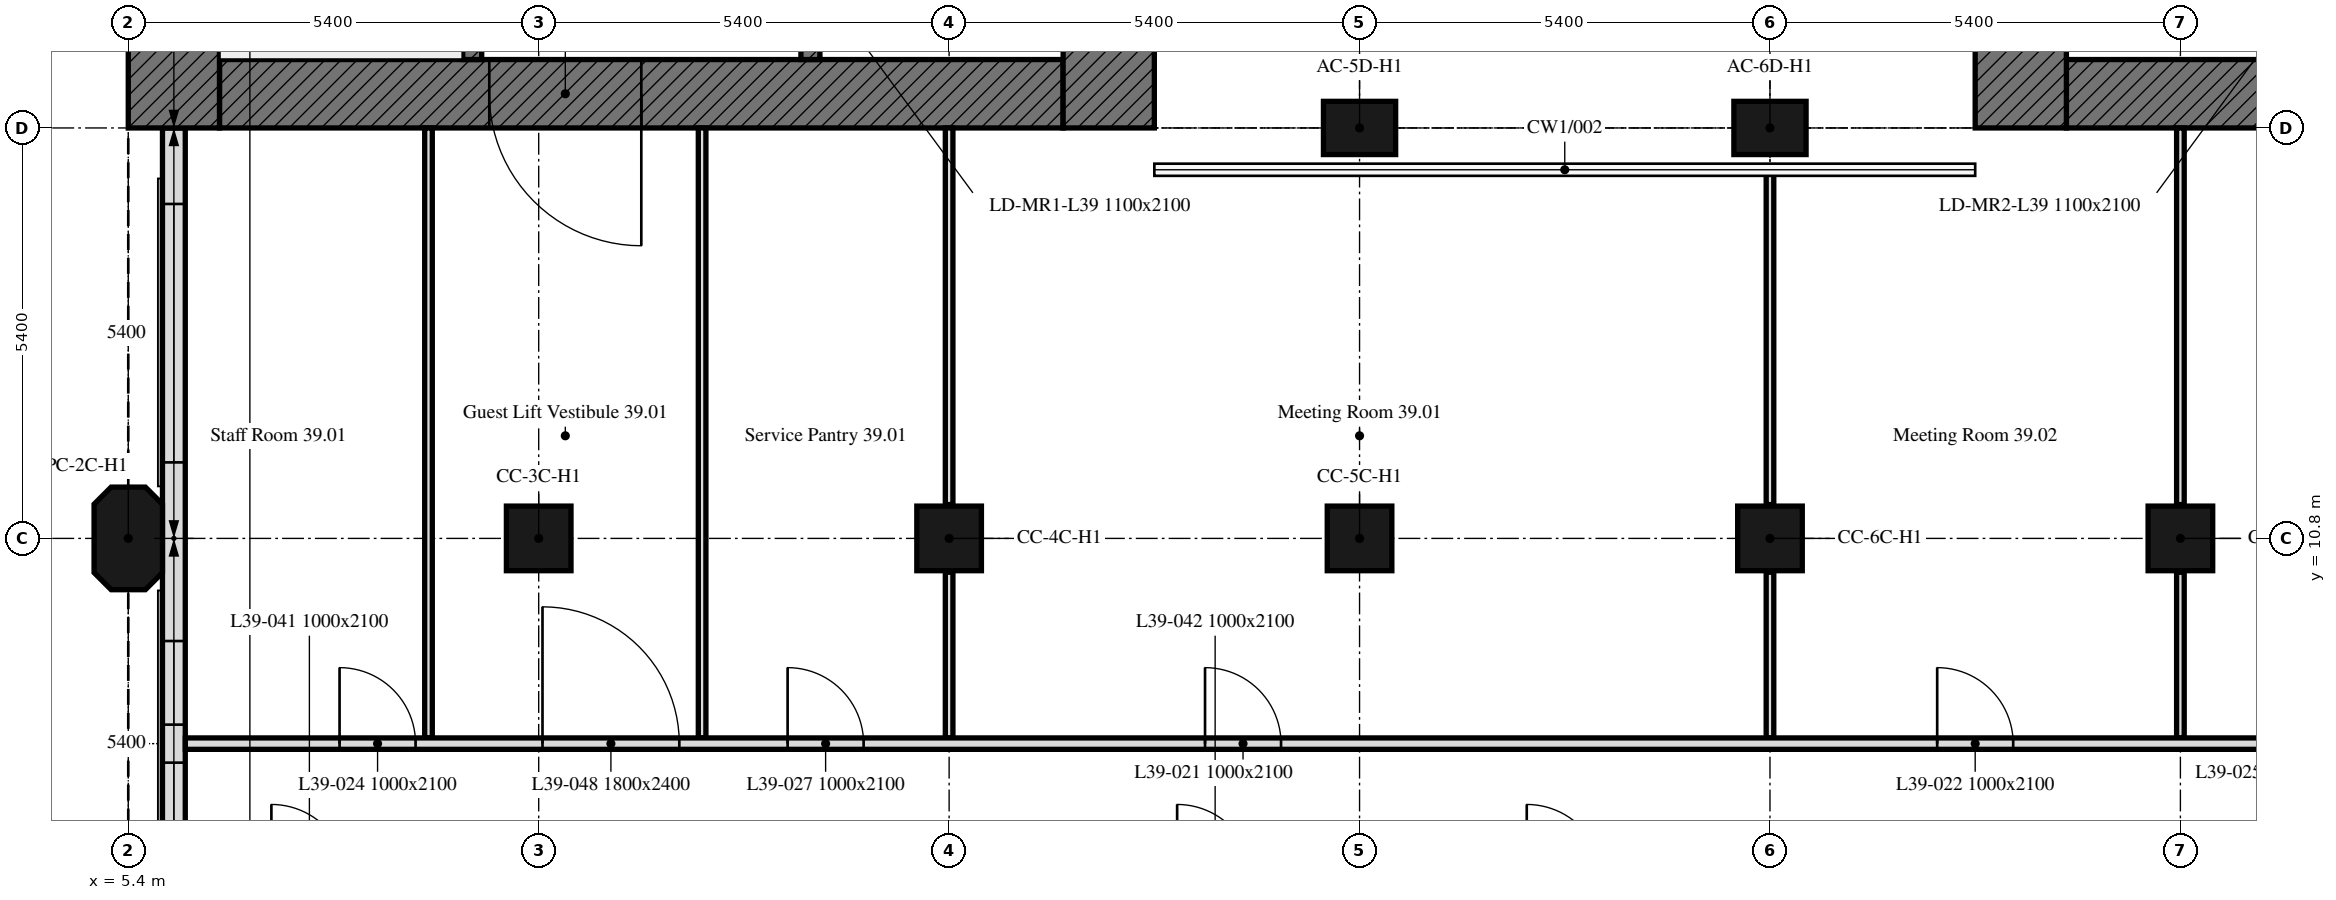
"""IFC4 building model, lengths in metres.
Left out: names, types, materials, properties, quantities, classifications, styles, units other than length and angle.
Written with IfcOpenShell. Run it as: python <this file> out.ifc"""

import sys

from ifc_helpers import new_model, si_unit, direction, frame, frame_2d, origin, origin_2d, place, context, subcontext, project, spatial, polyline, rectangle, outline, extrude, element, fill, save


model = new_model("IFC4")
c1 = context("Model", 3, precision=1e-05, world=origin(), true_north=direction((0.0, 1.0)))
c2 = subcontext(c1, "Body", "Model", "MODEL_VIEW")
j1 = project(units=[si_unit("LENGTHUNIT", "METRE"), si_unit("PLANEANGLEUNIT", "RADIAN")], contexts=[c1])
p1 = place(None, origin())
s1 = spatial("IfcSite", under=j1, at=p1, CompositionType="ELEMENT")
p2 = place(p1, origin())
s2 = spatial("IfcBuilding", under=s1, at=p2, CompositionType="ELEMENT")
p3 = place(p2, frame((0.0, 0.0, 166.0)))
s3 = spatial("IfcBuildingStorey", under=s2, at=p3, CompositionType="ELEMENT", Elevation=166.0)
p4 = place(p3, frame((5.4, 10.8, 0.0), z_axis=(0.0, 0.0, 1.0), x_axis=(0.0, 1.0, 0.0)))
e1 = element("IfcColumn", 1, at=p4, inside=s3, PredefinedType="COLUMN", context=c2, shape_type="SweptSolid", body=[
    extrude(outline(polyline([(-0.45, -0.45), (0.45, -0.45), (0.675, -0.225), (0.675, 0.225), (0.45, 0.45), (-0.45, 0.45), (-0.675, 0.225), (-0.675, -0.225), (-0.45, -0.45)])), origin(), (0.0, 0.0, 1.0), 3.0),
])
for number, where, z_axis, x_axis in (
    (2, (10.8, 10.8, 0.0), (0.0, 0.0, 1.0), (1.0, 0.0, 0.0)),
    (3, (16.2, 10.8, 0.0), (0.0, 0.0, 1.0), (1.0, 0.0, 0.0)),
    (4, (21.6, 10.8, 0.0), (0.0, 0.0, 1.0), (1.0, 0.0, 0.0)),
    (5, (27.0, 10.8, 0.0), (0.0, 0.0, 1.0), (1.0, 0.0, 0.0)),
    (6, (32.4, 10.8, 0.0), (0.0, 0.0, 1.0), (1.0, 0.0, 0.0)),
):
    element("IfcColumn", number, at=place(p3, frame(where, z_axis=z_axis, x_axis=x_axis)), inside=s3, PredefinedType="COLUMN", context=c2, shape_type="SweptSolid", body=[
        extrude(rectangle(XDim=0.85, YDim=0.85, at=origin_2d()), origin(), (0.0, 0.0, 1.0), 3.0),
    ])
for number, where, z_axis, x_axis in (
    (7, (21.6, 16.2, 0.0), (0.0, 0.0, 1.0), (1.0, 0.0, 0.0)),
    (8, (27.0, 16.2, 0.0), (0.0, 0.0, 1.0), (1.0, 0.0, 0.0)),
):
    element("IfcColumn", number, at=place(p3, frame(where, z_axis=z_axis, x_axis=x_axis)), inside=s3, PredefinedType="COLUMN", context=c2, shape_type="SweptSolid", body=[
        extrude(rectangle(XDim=0.95, YDim=0.7, at=origin_2d()), origin(), (0.0, 0.0, 1.0), 3.0),
    ])
p5 = place(p3, frame((6.0, 16.2, 0.0), z_axis=(0.0, 0.0, 1.0), x_axis=(0.0, -1.0, 0.0)))
e9 = element("IfcWall", 9, at=p5, inside=s3, PredefinedType="SOLIDWALL", context=c2, shape_type="SweptSolid", body=[
    extrude(rectangle(XDim=10.614, YDim=0.3, at=frame_2d((5.307, 0.0))), origin(), (0.0, 0.0, 1.0), 3.0),
])
p6 = place(p5, frame((1.0, 0.0, 0.9)))
e10 = element("IfcOpeningElement", 10, at=p6, cuts=e9, PredefinedType="OPENING", context=c2, shape_type="SweptSolid", body=[
    extrude(rectangle(XDim=3.4, YDim=1.7, at=frame_2d((1.7, 0.85))), frame((0.0, 0.16, 0.0), z_axis=(0.0, -1.0, 0.0), x_axis=(1.0, 0.0, 0.0)), (0.0, 0.0, 1.0), 0.32),
])
p7 = place(p5, frame((6.75, 0.0, 0.9)))
e11 = element("IfcOpeningElement", 11, at=p7, cuts=e9, PredefinedType="OPENING", context=c2, shape_type="SweptSolid", body=[
    extrude(rectangle(XDim=1.1, YDim=1.7, at=frame_2d((0.55, 0.85))), frame((0.0, 0.16, 0.0), z_axis=(0.0, -1.0, 0.0), x_axis=(1.0, 0.0, 0.0)), (0.0, 0.0, 1.0), 0.32),
])
p8 = place(p5, frame((8.35, 0.0, 0.9)))
e12 = element("IfcOpeningElement", 12, at=p8, cuts=e9, PredefinedType="OPENING", context=c2, shape_type="SweptSolid", body=[
    extrude(rectangle(XDim=1.1, YDim=1.7, at=frame_2d((0.55, 0.85))), frame((0.0, 0.16, 0.0), z_axis=(0.0, -1.0, 0.0), x_axis=(1.0, 0.0, 0.0)), (0.0, 0.0, 1.0), 0.32),
])
p9 = place(p3, frame((17.7, 16.65, 0.0), z_axis=(0.0, 0.0, 1.0), x_axis=(-1.0, 0.0, 0.0)))
e13 = element("IfcWall", 13, at=p9, inside=s3, PredefinedType="SOLIDWALL", context=c2, shape_type="SweptSolid", body=[
    extrude(rectangle(XDim=11.1, YDim=0.9, at=frame_2d((5.55, 0.0))), origin(), (0.0, 0.0, 1.0), 3.0),
])
p10 = place(p9, frame((5.55, 0.0, 0.0)))
e14 = element("IfcOpeningElement", 14, at=p10, cuts=e13, PredefinedType="OPENING", context=c2, shape_type="SweptSolid", body=[
    extrude(rectangle(XDim=2.0, YDim=2.4, at=frame_2d((1.0, 1.2))), frame((0.0, 0.45, 0.0), z_axis=(0.0, -1.0, 0.0), x_axis=(1.0, 0.0, 0.0)), (0.0, 0.0, 1.0), 0.9),
])
for number, where, z_axis, x_axis in (
    (15, (6.0, 16.2, 0.0), (0.0, 0.0, 1.0), (0.0, 1.0, 0.0)),
    (16, (18.3, 32.4, 0.0), (0.0, 0.0, 1.0), (0.0, -1.0, 0.0)),
):
    element("IfcWall", number, at=place(p3, frame(where, z_axis=z_axis, x_axis=x_axis)), inside=s3, PredefinedType="SOLIDWALL", context=c2, shape_type="SweptSolid", body=[
        extrude(rectangle(XDim=16.2, YDim=1.2, at=frame_2d((8.1, 0.0))), origin(), (0.0, 0.0, 1.0), 3.0),
    ])
p11 = place(p3, frame((9.925, 17.1, 0.0), z_axis=(0.0, 0.0, 1.0), x_axis=(0.0, 1.0, 0.0)))
e17 = element("IfcWall", 17, at=p11, inside=s3, PredefinedType="SOLIDWALL", context=c2, shape_type="SweptSolid", body=[
    extrude(rectangle(XDim=14.4, YDim=0.25, at=frame_2d((7.2, 0.0))), origin(), (0.0, 0.0, 1.0), 3.0),
])
p12 = place(p11, frame((4.6, 0.0, 0.0)))
e18 = element("IfcOpeningElement", 18, at=p12, cuts=e17, PredefinedType="OPENING", context=c2, shape_type="SweptSolid", body=[
    extrude(rectangle(XDim=1.0, YDim=2.1, at=frame_2d((0.5, 1.05))), frame((0.0, 0.125, 0.0), z_axis=(0.0, -1.0, 0.0), x_axis=(1.0, 0.0, 0.0)), (0.0, 0.0, 1.0), 0.25),
])
p13 = place(p11, frame((7.062, 0.0, 0.0)))
e19 = element("IfcOpeningElement", 19, at=p13, cuts=e17, PredefinedType="OPENING", context=c2, shape_type="SweptSolid", body=[
    extrude(rectangle(XDim=1.2, YDim=2.1, at=frame_2d((0.6, 1.05))), frame((0.0, 0.125, 0.0), z_axis=(0.0, -1.0, 0.0), x_axis=(1.0, 0.0, 0.0)), (0.0, 0.0, 1.0), 0.25),
])
p14 = place(p11, frame((10.106, 0.0, 0.0)))
e20 = element("IfcOpeningElement", 20, at=p14, cuts=e17, PredefinedType="OPENING", context=c2, shape_type="SweptSolid", body=[
    extrude(rectangle(XDim=0.9, YDim=2.1, at=frame_2d((0.45, 1.05))), frame((0.0, 0.125, 0.0), z_axis=(0.0, -1.0, 0.0), x_axis=(1.0, 0.0, 0.0)), (0.0, 0.0, 1.0), 0.25),
])
p15 = place(p11, frame((12.048, 0.0, 0.0)))
e21 = element("IfcOpeningElement", 21, at=p15, cuts=e17, PredefinedType="OPENING", context=c2, shape_type="SweptSolid", body=[
    extrude(rectangle(XDim=0.9, YDim=2.1, at=frame_2d((0.45, 1.05))), frame((0.0, 0.125, 0.0), z_axis=(0.0, -1.0, 0.0), x_axis=(1.0, 0.0, 0.0)), (0.0, 0.0, 1.0), 0.25),
])
p16 = place(p11, frame((13.354, 0.0, 0.0)))
e22 = element("IfcOpeningElement", 22, at=p16, cuts=e17, PredefinedType="OPENING", context=c2, shape_type="SweptSolid", body=[
    extrude(rectangle(XDim=0.9, YDim=2.1, at=frame_2d((0.45, 1.05))), frame((0.0, 0.125, 0.0), z_axis=(0.0, -1.0, 0.0), x_axis=(1.0, 0.0, 0.0)), (0.0, 0.0, 1.0), 0.25),
])
p17 = place(p3, frame((14.375, 17.1, 0.0), z_axis=(0.0, 0.0, 1.0), x_axis=(0.0, 1.0, 0.0)))
e23 = element("IfcWall", 23, at=p17, inside=s3, PredefinedType="SOLIDWALL", context=c2, shape_type="SweptSolid", body=[
    extrude(rectangle(XDim=14.4, YDim=0.25, at=frame_2d((7.2, 0.0))), origin(), (0.0, 0.0, 1.0), 3.0),
])
p18 = place(p17, frame((13.15, 0.0, 0.0)))
e24 = element("IfcOpeningElement", 24, at=p18, cuts=e23, PredefinedType="OPENING", context=c2, shape_type="SweptSolid", body=[
    extrude(rectangle(XDim=1.0, YDim=2.1, at=frame_2d((0.5, 1.05))), frame((0.0, 0.125, 0.0), z_axis=(0.0, -1.0, 0.0), x_axis=(1.0, 0.0, 0.0)), (0.0, 0.0, 1.0), 0.25),
])
p19 = place(p17, frame((0.6, 0.0, 0.0)))
e25 = element("IfcOpeningElement", 25, at=p19, cuts=e23, PredefinedType="OPENING", context=c2, shape_type="SweptSolid", body=[
    extrude(rectangle(XDim=1.1, YDim=2.1, at=frame_2d((0.55, 1.05))), frame((0.0, 0.125, 0.0), z_axis=(0.0, -1.0, 0.0), x_axis=(1.0, 0.0, 0.0)), (0.0, 0.0, 1.0), 0.25),
])
p20 = place(p17, frame((3.25, 0.0, 0.0)))
e26 = element("IfcOpeningElement", 26, at=p20, cuts=e23, PredefinedType="OPENING", context=c2, shape_type="SweptSolid", body=[
    extrude(rectangle(XDim=0.9, YDim=2.1, at=frame_2d((0.45, 1.05))), frame((0.0, 0.125, 0.0), z_axis=(0.0, -1.0, 0.0), x_axis=(1.0, 0.0, 0.0)), (0.0, 0.0, 1.0), 0.25),
])
p21 = place(p3, frame((42.0, 16.65, 0.0), z_axis=(0.0, 0.0, 1.0), x_axis=(-1.0, 0.0, 0.0)))
e27 = element("IfcWall", 27, at=p21, inside=s3, PredefinedType="SOLIDWALL", context=c2, shape_type="SweptSolid", body=[
    extrude(rectangle(XDim=11.1, YDim=0.9, at=frame_2d((5.55, 0.0))), origin(), (0.0, 0.0, 1.0), 3.0),
])
p22 = place(p21, frame((3.55, 0.0, 0.0)))
e28 = element("IfcOpeningElement", 28, at=p22, cuts=e27, PredefinedType="OPENING", context=c2, shape_type="SweptSolid", body=[
    extrude(rectangle(XDim=2.0, YDim=2.4, at=frame_2d((1.0, 1.2))), frame((0.0, 0.45, 0.0), z_axis=(0.0, -1.0, 0.0), x_axis=(1.0, 0.0, 0.0)), (0.0, 0.0, 1.0), 0.9),
])
p23 = place(p3, frame((30.3, 16.2, 0.0), z_axis=(0.0, 0.0, 1.0), x_axis=(0.0, 1.0, 0.0)))
e29 = element("IfcWall", 29, at=p23, inside=s3, PredefinedType="SOLIDWALL", context=c2, shape_type="SweptSolid", body=[
    extrude(rectangle(XDim=16.2, YDim=1.2, at=frame_2d((8.1, 0.0))), origin(), (0.0, 0.0, 1.0), 3.0),
])
p24 = place(p3, frame((16.2, 16.2, 0.0), z_axis=(0.0, 0.0, 1.0), x_axis=(0.0, -1.0, 0.0)))
e30 = element("IfcWall", 30, at=p24, inside=s3, PredefinedType="PARTITIONING", context=c2, shape_type="SweptSolid", body=[
    extrude(rectangle(XDim=4.955, YDim=0.1, at=frame_2d((2.478, 0.0))), origin(), (0.0, 0.0, 1.0), 2.4),
])
for number, where, z_axis, x_axis in (
    (31, (16.2, 10.355, 0.0), (0.0, 0.0, 1.0), (0.0, -1.0, 0.0)),
    (32, (27.0, 8.175, 0.0), (0.0, 0.0, 1.0), (0.0, 1.0, 0.0)),
):
    element("IfcWall", number, at=place(p3, frame(where, z_axis=z_axis, x_axis=x_axis)), inside=s3, PredefinedType="PARTITIONING", context=c2, shape_type="SweptSolid", body=[
        extrude(rectangle(XDim=2.18, YDim=0.1, at=frame_2d((1.09, 0.0))), origin(), (0.0, 0.0, 1.0), 2.4),
    ])
p25 = place(p3, frame((27.0, 11.245, 0.0), z_axis=(0.0, 0.0, 1.0), x_axis=(0.0, 1.0, 0.0)))
e33 = element("IfcWall", 33, at=p25, inside=s3, PredefinedType="PARTITIONING", context=c2, shape_type="SweptSolid", body=[
    extrude(rectangle(XDim=4.46, YDim=0.1, at=frame_2d((2.23, 0.0))), origin(), (0.0, 0.0, 1.0), 2.4),
])
p26 = place(p3, frame((32.4, 8.175, 0.0), z_axis=(0.0, 0.0, 1.0), x_axis=(0.0, 1.0, 0.0)))
e34 = element("IfcWall", 34, at=p26, inside=s3, PredefinedType="PARTITIONING", context=c2, shape_type="SweptSolid", body=[
    extrude(rectangle(XDim=2.18, YDim=0.1, at=frame_2d((1.09, 0.0))), origin(), (0.0, 0.0, 1.0), 2.4),
])
p27 = place(p3, frame((32.4, 11.245, 0.0), z_axis=(0.0, 0.0, 1.0), x_axis=(0.0, 1.0, 0.0)))
e35 = element("IfcWall", 35, at=p27, inside=s3, PredefinedType="PARTITIONING", context=c2, shape_type="SweptSolid", body=[
    extrude(rectangle(XDim=4.955, YDim=0.1, at=frame_2d((2.478, 0.0))), origin(), (0.0, 0.0, 1.0), 2.4),
])
for number, where, z_axis, x_axis in (
    (36, (9.35, 16.2, 0.0), (0.0, 0.0, 1.0), (0.0, -1.0, 0.0)),
    (37, (12.95, 8.175, 0.0), (0.0, 0.0, 1.0), (0.0, 1.0, 0.0)),
):
    element("IfcWall", number, at=place(p3, frame(where, z_axis=z_axis, x_axis=x_axis)), inside=s3, PredefinedType="PARTITIONING", context=c2, shape_type="SweptSolid", body=[
        extrude(rectangle(XDim=8.025, YDim=0.1, at=frame_2d((4.012, 0.0))), origin(), (0.0, 0.0, 1.0), 3.0),
    ])
p28 = place(p3, frame((6.151, 8.1, 0.0), z_axis=(0.0, 0.0, 1.0), x_axis=(1.0, 0.0, 0.0)))
e38 = element("IfcWall", 38, at=p28, inside=s3, PredefinedType="PARTITIONING", context=c2, shape_type="SweptSolid", body=[
    extrude(rectangle(XDim=36.974, YDim=0.15, at=frame_2d((18.487, 0.0))), origin(), (0.0, 0.0, 1.0), 2.4),
])
p29 = place(p28, frame((13.416, 0.0, 0.0)))
e39 = element("IfcOpeningElement", 39, at=p29, cuts=e38, PredefinedType="OPENING", context=c2, shape_type="SweptSolid", body=[
    extrude(rectangle(XDim=1.0, YDim=2.1, at=frame_2d((0.5, 1.05))), frame((0.0, 0.075, 0.0), z_axis=(0.0, -1.0, 0.0), x_axis=(1.0, 0.0, 0.0)), (0.0, 0.0, 1.0), 0.15),
])
p30 = place(p28, frame((23.049, 0.0, 0.0)))
e40 = element("IfcOpeningElement", 40, at=p30, cuts=e38, PredefinedType="OPENING", context=c2, shape_type="SweptSolid", body=[
    extrude(rectangle(XDim=1.0, YDim=2.1, at=frame_2d((0.5, 1.05))), frame((0.0, 0.075, 0.0), z_axis=(0.0, -1.0, 0.0), x_axis=(1.0, 0.0, 0.0)), (0.0, 0.0, 1.0), 0.15),
])
p31 = place(p28, frame((2.029, 0.0, 0.0)))
e41 = element("IfcOpeningElement", 41, at=p31, cuts=e38, PredefinedType="OPENING", context=c2, shape_type="SweptSolid", body=[
    extrude(rectangle(XDim=1.0, YDim=2.1, at=frame_2d((0.5, 1.05))), frame((0.0, 0.075, 0.0), z_axis=(0.0, -1.0, 0.0), x_axis=(1.0, 0.0, 0.0)), (0.0, 0.0, 1.0), 0.15),
])
p32 = place(p28, frame((27.374, 0.0, 0.0)))
e42 = element("IfcOpeningElement", 42, at=p32, cuts=e38, PredefinedType="OPENING", context=c2, shape_type="SweptSolid", body=[
    extrude(rectangle(XDim=1.0, YDim=2.1, at=frame_2d((0.5, 1.05))), frame((0.0, 0.075, 0.0), z_axis=(0.0, -1.0, 0.0), x_axis=(1.0, 0.0, 0.0)), (0.0, 0.0, 1.0), 0.15),
])
p33 = place(p28, frame((7.924, 0.0, 0.0)))
e43 = element("IfcOpeningElement", 43, at=p33, cuts=e38, PredefinedType="OPENING", context=c2, shape_type="SweptSolid", body=[
    extrude(rectangle(XDim=1.0, YDim=2.1, at=frame_2d((0.5, 1.05))), frame((0.0, 0.075, 0.0), z_axis=(0.0, -1.0, 0.0), x_axis=(1.0, 0.0, 0.0)), (0.0, 0.0, 1.0), 0.15),
])
p34 = place(p28, frame((4.699, 0.0, 0.0)))
e44 = element("IfcOpeningElement", 44, at=p34, cuts=e38, PredefinedType="OPENING", context=c2, shape_type="SweptSolid", body=[
    extrude(rectangle(XDim=1.8, YDim=2.4, at=frame_2d((0.9, 1.2))), frame((0.0, 0.075, 0.0), z_axis=(0.0, -1.0, 0.0), x_axis=(1.0, 0.0, 0.0)), (0.0, 0.0, 1.0), 0.15),
])
p35 = place(p28, frame((30.199, 0.0, 0.0)))
e45 = element("IfcOpeningElement", 45, at=p35, cuts=e38, PredefinedType="OPENING", context=c2, shape_type="SweptSolid", body=[
    extrude(rectangle(XDim=1.0, YDim=2.1, at=frame_2d((0.5, 1.05))), frame((0.0, 0.075, 0.0), z_axis=(0.0, -1.0, 0.0), x_axis=(1.0, 0.0, 0.0)), (0.0, 0.0, 1.0), 0.15),
])
p36 = place(p6, origin())
e46 = element("IfcWindow", 46, at=p36, inside=s3, PartitioningType="SINGLE_PANEL", PredefinedType="WINDOW", context=c2, shape_type="SweptSolid", body=[
    extrude(rectangle(XDim=3.4, YDim=1.7, at=frame_2d((1.7, 0.85))), frame((0.0, 0.03, 0.0), z_axis=(0.0, -1.0, 0.0), x_axis=(1.0, 0.0, 0.0)), (0.0, 0.0, 1.0), 0.06),
])
fill(e10, e46)
p37 = place(p7, origin())
e47 = element("IfcWindow", 47, at=p37, inside=s3, PartitioningType="SINGLE_PANEL", PredefinedType="WINDOW", context=c2, shape_type="SweptSolid", body=[
    extrude(rectangle(XDim=1.1, YDim=1.7, at=frame_2d((0.55, 0.85))), frame((0.0, 0.03, 0.0), z_axis=(0.0, -1.0, 0.0), x_axis=(1.0, 0.0, 0.0)), (0.0, 0.0, 1.0), 0.06),
])
fill(e11, e47)
p38 = place(p8, origin())
e48 = element("IfcWindow", 48, at=p38, inside=s3, PartitioningType="SINGLE_PANEL", PredefinedType="WINDOW", context=c2, shape_type="SweptSolid", body=[
    extrude(rectangle(XDim=1.1, YDim=1.7, at=frame_2d((0.55, 0.85))), frame((0.0, 0.03, 0.0), z_axis=(0.0, -1.0, 0.0), x_axis=(1.0, 0.0, 0.0)), (0.0, 0.0, 1.0), 0.06),
])
fill(e12, e48)
p39 = place(p10, origin())
e49 = element("IfcDoor", 49, at=p39, inside=s3, OperationType="DOUBLE_DOOR_SINGLE_SWING", PredefinedType="DOOR", context=c2, shape_type="SweptSolid", body=[
    extrude(rectangle(XDim=2.0, YDim=2.4, at=frame_2d((1.0, 1.2))), frame((0.0, 0.025, 0.0), z_axis=(0.0, -1.0, 0.0), x_axis=(1.0, 0.0, 0.0)), (0.0, 0.0, 1.0), 0.05),
])
fill(e14, e49)
p40 = place(p29, origin())
e50 = element("IfcDoor", 50, at=p40, inside=s3, OperationType="SINGLE_SWING_LEFT", PredefinedType="DOOR", context=c2, shape_type="SweptSolid", body=[
    extrude(rectangle(XDim=1.0, YDim=2.1, at=frame_2d((0.5, 1.05))), frame((0.0, 0.025, 0.0), z_axis=(0.0, -1.0, 0.0), x_axis=(1.0, 0.0, 0.0)), (0.0, 0.0, 1.0), 0.05),
])
fill(e39, e50)
p41 = place(p30, origin())
e51 = element("IfcDoor", 51, at=p41, inside=s3, OperationType="SINGLE_SWING_RIGHT", PredefinedType="DOOR", context=c2, shape_type="SweptSolid", body=[
    extrude(rectangle(XDim=1.0, YDim=2.1, at=frame_2d((0.5, 1.05))), frame((0.0, 0.025, 0.0), z_axis=(0.0, -1.0, 0.0), x_axis=(1.0, 0.0, 0.0)), (0.0, 0.0, 1.0), 0.05),
])
fill(e40, e51)
p42 = place(p31, origin())
e52 = element("IfcDoor", 52, at=p42, inside=s3, OperationType="SINGLE_SWING_RIGHT", PredefinedType="DOOR", context=c2, shape_type="SweptSolid", body=[
    extrude(rectangle(XDim=1.0, YDim=2.1, at=frame_2d((0.5, 1.05))), frame((0.0, 0.025, 0.0), z_axis=(0.0, -1.0, 0.0), x_axis=(1.0, 0.0, 0.0)), (0.0, 0.0, 1.0), 0.05),
])
fill(e41, e52)
p43 = place(p33, origin())
e53 = element("IfcDoor", 53, at=p43, inside=s3, OperationType="SINGLE_SWING_LEFT", PredefinedType="DOOR", context=c2, shape_type="SweptSolid", body=[
    extrude(rectangle(XDim=1.0, YDim=2.1, at=frame_2d((0.5, 1.05))), frame((0.0, 0.025, 0.0), z_axis=(0.0, -1.0, 0.0), x_axis=(1.0, 0.0, 0.0)), (0.0, 0.0, 1.0), 0.05),
])
fill(e43, e53)
p44 = place(p34, origin())
e54 = element("IfcDoor", 54, at=p44, inside=s3, OperationType="DOUBLE_DOOR_SINGLE_SWING", PredefinedType="DOOR", context=c2, shape_type="SweptSolid", body=[
    extrude(rectangle(XDim=1.8, YDim=2.4, at=frame_2d((0.9, 1.2))), frame((0.0, 0.025, 0.0), z_axis=(0.0, -1.0, 0.0), x_axis=(1.0, 0.0, 0.0)), (0.0, 0.0, 1.0), 0.05),
])
fill(e44, e54)
save(model, sys.argv[1])
